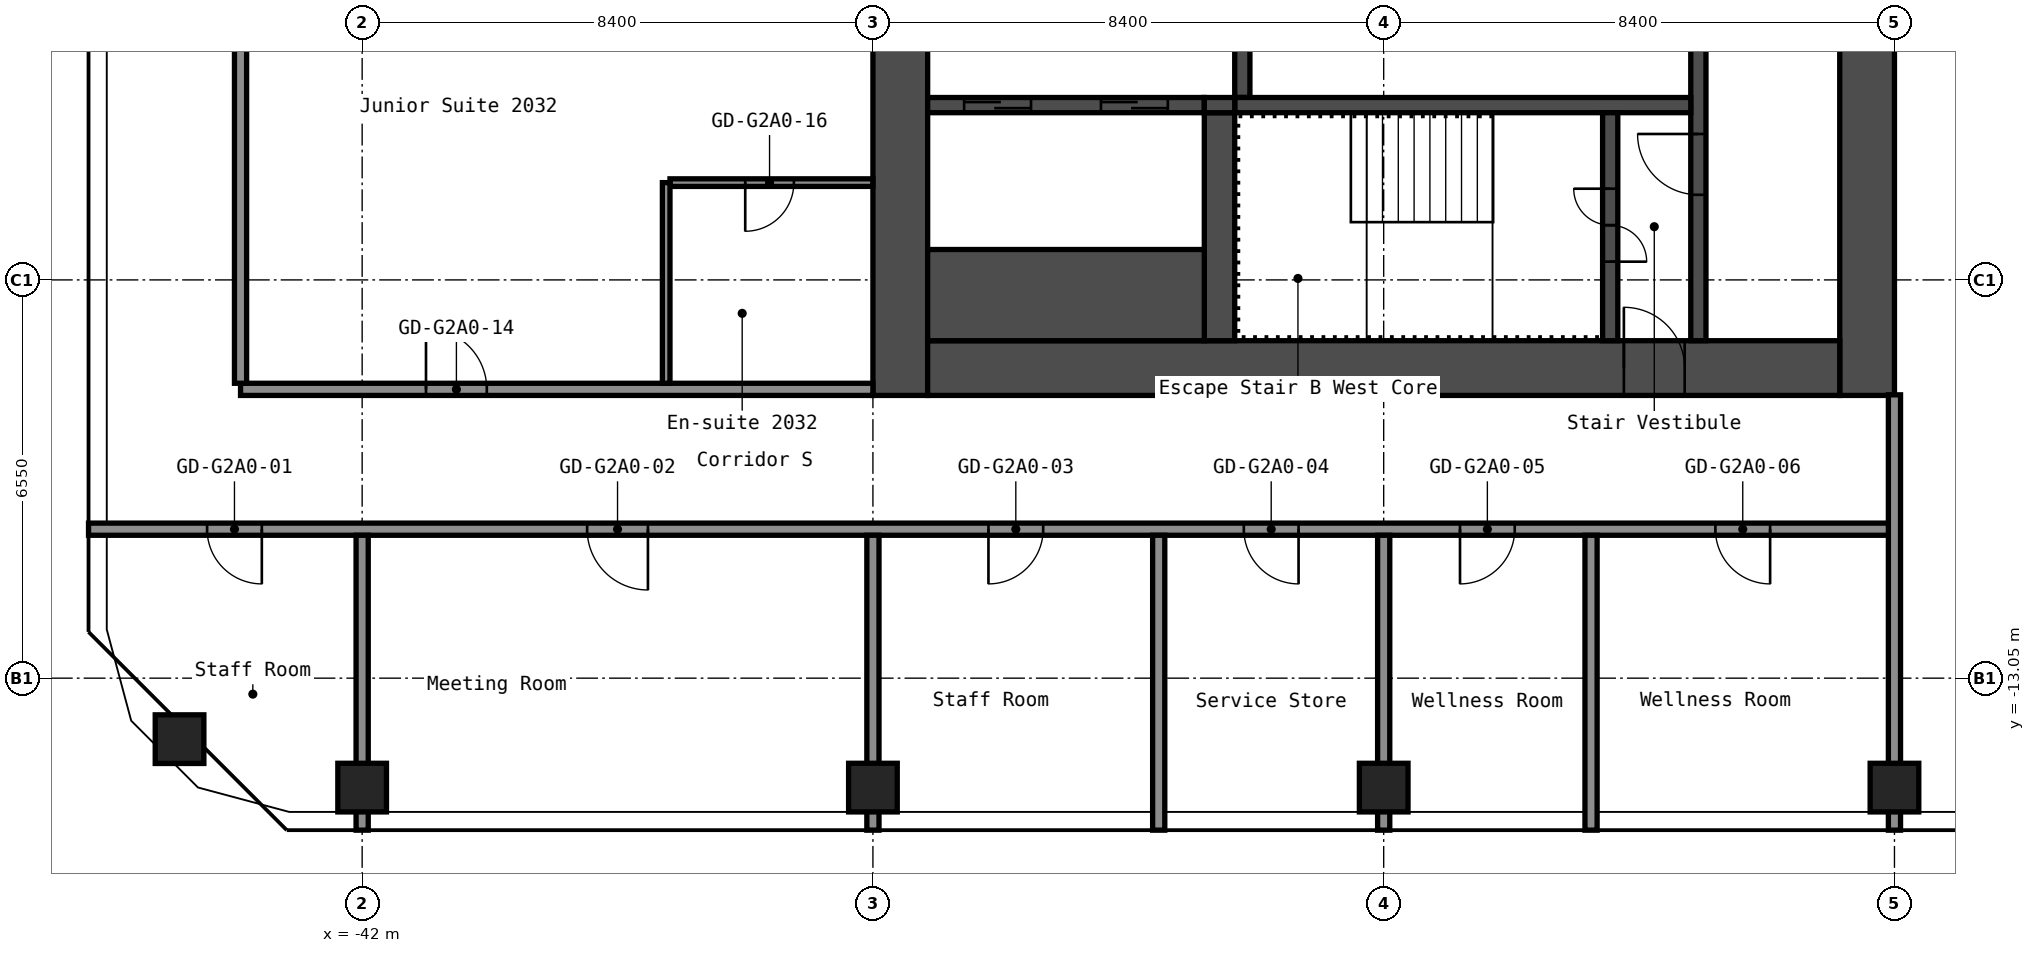
"""IFC4 building model, lengths in metres.
Left out: names, types, materials, properties, quantities, classifications, styles, units other than length and angle.
Written with IfcOpenShell. Run it as: python <this file> out.ifc"""

import sys

from ifc_helpers import new_model, si_unit, direction, frame, frame_2d, origin, origin_2d, place, context, subcontext, project, spatial, rectangle, hollow_rectangle, extrude, element, fill, save


model = new_model("IFC4")
c1 = context("Model", 3, precision=1e-05, world=origin(), true_north=direction((0.0, 1.0)))
c2 = subcontext(c1, "Body", "Model", "MODEL_VIEW")
j1 = project(units=[si_unit("LENGTHUNIT", "METRE"), si_unit("PLANEANGLEUNIT", "RADIAN")], contexts=[c1])
p1 = place(None, origin())
s1 = spatial("IfcSite", under=j1, at=p1, CompositionType="ELEMENT")
p2 = place(p1, origin())
s2 = spatial("IfcBuilding", under=s1, at=p2, CompositionType="ELEMENT")
p3 = place(p2, frame((0.0, 0.0, 75.4)))
s3 = spatial("IfcBuildingStorey", under=s2, at=p3, CompositionType="ELEMENT", Elevation=75.4)
for number, where, z_axis, x_axis in (
    (1, (-45.003, -14.053, 0.0), (0.0, 0.0, 1.0), (1.0, 0.0, 0.0)),
    (2, (-42.0, -14.85, 0.0), (0.0, 0.0, 1.0), (1.0, 0.0, 0.0)),
    (3, (-33.6, -14.85, 0.0), (0.0, 0.0, 1.0), (1.0, 0.0, 0.0)),
    (4, (-25.2, -14.85, 0.0), (0.0, 0.0, 1.0), (1.0, 0.0, 0.0)),
    (5, (-16.8, -14.85, 0.0), (0.0, 0.0, 1.0), (1.0, 0.0, 0.0)),
):
    element("IfcColumn", number, at=place(p3, frame(where, z_axis=z_axis, x_axis=x_axis)), inside=s3, PredefinedType="COLUMN", context=c2, shape_type="SweptSolid", body=[
        extrude(hollow_rectangle(XDim=0.8, YDim=0.8, WallThickness=0.032, at=origin_2d()), origin(), (0.0, 0.0, 1.0), 2.8),
    ])
p4 = place(p3, frame((-17.25, -8.4, 0.0), z_axis=(0.0, 0.0, 1.0), x_axis=(0.0, 1.0, 0.0)))
e6 = element("IfcWall", 6, at=p4, inside=s3, PredefinedType="SHEAR", context=c2, shape_type="SweptSolid", body=[
    extrude(rectangle(XDim=16.8, YDim=0.9, at=frame_2d((8.4, 0.0))), origin(), (0.0, 0.0, 1.0), 2.8),
])
p5 = place(p4, frame((7.6, 0.0, 0.0)))
e7 = element("IfcOpeningElement", 7, at=p5, cuts=e6, PredefinedType="OPENING", context=c2, shape_type="SweptSolid", body=[
    extrude(rectangle(XDim=1.2, YDim=2.1, at=frame_2d((0.6, 1.05))), frame((0.0, 0.46, 0.0), z_axis=(0.0, -1.0, 0.0), x_axis=(1.0, 0.0, 0.0)), (0.0, 0.0, 1.0), 0.92),
])
p6 = place(p3, frame((-33.15, -8.4, 0.0), z_axis=(0.0, 0.0, 1.0), x_axis=(0.0, 1.0, 0.0)))
e8 = element("IfcWall", 8, at=p6, inside=s3, PredefinedType="SHEAR", context=c2, shape_type="SweptSolid", body=[
    extrude(rectangle(XDim=16.8, YDim=0.9, at=frame_2d((8.4, 0.0))), origin(), (0.0, 0.0, 1.0), 2.8),
])
p7 = place(p3, frame((-32.7, -7.95, 0.0), z_axis=(0.0, 0.0, 1.0), x_axis=(1.0, 0.0, 0.0)))
e9 = element("IfcWall", 9, at=p7, inside=s3, PredefinedType="SHEAR", context=c2, shape_type="SweptSolid", body=[
    extrude(rectangle(XDim=15.0, YDim=0.9, at=frame_2d((7.5, 0.0))), origin(), (0.0, 0.0, 1.0), 2.8),
])
p8 = place(p7, frame((11.45, 0.0, 0.0)))
e10 = element("IfcOpeningElement", 10, at=p8, cuts=e9, PredefinedType="OPENING", context=c2, shape_type="SweptSolid", body=[
    extrude(rectangle(XDim=1.0, YDim=2.1, at=frame_2d((0.5, 1.05))), frame((0.0, 0.46, 0.0), z_axis=(0.0, -1.0, 0.0), x_axis=(1.0, 0.0, 0.0)), (0.0, 0.0, 1.0), 0.92),
])
p9 = place(p3, frame((-20.025, -7.5, 0.0), z_axis=(0.0, 0.0, 1.0), x_axis=(0.0, 1.0, 0.0)))
e11 = element("IfcWall", 11, at=p9, inside=s3, PredefinedType="SHEAR", context=c2, shape_type="SweptSolid", body=[
    extrude(rectangle(XDim=6.3, YDim=0.25, at=frame_2d((3.15, 0.0))), origin(), (0.0, 0.0, 1.0), 2.8),
])
p10 = place(p9, frame((2.4, 0.0, 0.0)))
e12 = element("IfcOpeningElement", 12, at=p10, cuts=e11, PredefinedType="OPENING", context=c2, shape_type="SweptSolid", body=[
    extrude(rectangle(XDim=1.0, YDim=2.1, at=frame_2d((0.5, 1.05))), frame((0.0, 0.135, 0.0), z_axis=(0.0, -1.0, 0.0), x_axis=(1.0, 0.0, 0.0)), (0.0, 0.0, 1.0), 0.27),
])
p11 = place(p3, frame((-27.525, -3.5, 0.0), z_axis=(0.0, 0.0, 1.0), x_axis=(0.0, 1.0, 0.0)))
e13 = element("IfcWall", 13, at=p11, inside=s3, PredefinedType="SHEAR", context=c2, shape_type="SweptSolid", body=[
    extrude(rectangle(XDim=2.05, YDim=0.25, at=frame_2d((1.025, 0.0))), origin(), (0.0, 0.0, 1.0), 2.8),
])
p12 = place(p3, frame((-27.65, -3.625, 0.0), z_axis=(0.0, 0.0, 1.0), x_axis=(1.0, 0.0, 0.0)))
e14 = element("IfcWall", 14, at=p12, inside=s3, PredefinedType="SHEAR", context=c2, shape_type="SweptSolid", body=[
    extrude(rectangle(XDim=7.5, YDim=0.25, at=frame_2d((3.75, 0.0))), origin(), (0.0, 0.0, 1.0), 2.8),
])
p13 = place(p3, frame((-21.475, -7.5, 0.0), z_axis=(0.0, 0.0, 1.0), x_axis=(0.0, 1.0, 0.0)))
e15 = element("IfcWall", 15, at=p13, inside=s3, PredefinedType="SHEAR", context=c2, shape_type="SweptSolid", body=[
    extrude(rectangle(XDim=3.75, YDim=0.25, at=frame_2d((1.875, 0.0))), origin(), (0.0, 0.0, 1.0), 2.8),
])
p14 = place(p13, frame((1.3, 0.0, 0.0)))
e16 = element("IfcOpeningElement", 16, at=p14, cuts=e15, PredefinedType="OPENING", context=c2, shape_type="SweptSolid", body=[
    extrude(rectangle(XDim=1.2, YDim=2.1, at=frame_2d((0.6, 1.05))), frame((0.0, 0.135, 0.0), z_axis=(0.0, -1.0, 0.0), x_axis=(1.0, 0.0, 0.0)), (0.0, 0.0, 1.0), 0.27),
])
p15 = place(p3, frame((-27.9, -7.5, 0.0), z_axis=(0.0, 0.0, 1.0), x_axis=(0.0, 1.0, 0.0)))
e17 = element("IfcWall", 17, at=p15, inside=s3, PredefinedType="SHEAR", context=c2, shape_type="SweptSolid", body=[
    extrude(rectangle(XDim=3.75, YDim=0.5, at=frame_2d((1.875, 0.0))), origin(), (0.0, 0.0, 1.0), 2.8),
])
p16 = place(p3, frame((-32.7, -3.625, 0.0), z_axis=(0.0, 0.0, 1.0), x_axis=(1.0, 0.0, 0.0)))
e18 = element("IfcWall", 18, at=p16, inside=s3, PredefinedType="SHEAR", context=c2, shape_type="SweptSolid", body=[
    extrude(rectangle(XDim=4.55, YDim=0.25, at=frame_2d((2.275, 0.0))), origin(), (0.0, 0.0, 1.0), 2.8),
])
p17 = place(p16, frame((2.85, 0.0, 0.0)))
e19 = element("IfcOpeningElement", 19, at=p17, cuts=e18, PredefinedType="OPENING", context=c2, shape_type="SweptSolid", body=[
    extrude(rectangle(XDim=1.1, YDim=2.1, at=frame_2d((0.55, 1.05))), frame((0.0, 0.135, 0.0), z_axis=(0.0, -1.0, 0.0), x_axis=(1.0, 0.0, 0.0)), (0.0, 0.0, 1.0), 0.27),
])
p18 = place(p16, frame((0.6, 0.0, 0.0)))
e20 = element("IfcOpeningElement", 20, at=p18, cuts=e18, PredefinedType="OPENING", context=c2, shape_type="SweptSolid", body=[
    extrude(rectangle(XDim=1.1, YDim=2.1, at=frame_2d((0.55, 1.05))), frame((0.0, 0.135, 0.0), z_axis=(0.0, -1.0, 0.0), x_axis=(1.0, 0.0, 0.0)), (0.0, 0.0, 1.0), 0.27),
])
p19 = place(p3, frame((-32.7, -6.75, 0.0), z_axis=(0.0, 0.0, 1.0), x_axis=(1.0, 0.0, 0.0)))
e21 = element("IfcWall", 21, at=p19, inside=s3, PredefinedType="SHEAR", context=c2, shape_type="SweptSolid", body=[
    extrude(rectangle(XDim=4.55, YDim=1.5, at=frame_2d((2.275, 0.0))), origin(), (0.0, 0.0, 1.0), 2.8),
])
p20 = place(p3, frame((-28.15, -3.625, 0.0), z_axis=(0.0, 0.0, 1.0), x_axis=(1.0, 0.0, 0.0)))
e22 = element("IfcWall", 22, at=p20, inside=s3, PredefinedType="SHEAR", context=c2, shape_type="SweptSolid", body=[
    extrude(rectangle(XDim=0.5, YDim=0.25, at=frame_2d((0.25, 0.0))), origin(), (0.0, 0.0, 1.0), 2.8),
])
p21 = place(p3, frame((-46.5, -10.6, 0.0), z_axis=(0.0, 0.0, 1.0), x_axis=(1.0, 0.0, 0.0)))
e23 = element("IfcWall", 23, at=p21, inside=s3, PredefinedType="PARTITIONING", context=c2, shape_type="SweptSolid", body=[
    extrude(rectangle(XDim=29.7, YDim=0.2, at=frame_2d((14.85, 0.0))), origin(), (0.0, 0.0, 1.0), 2.8),
])
p22 = place(p21, frame((1.95, 0.0, 0.0)))
e24 = element("IfcOpeningElement", 24, at=p22, cuts=e23, PredefinedType="OPENING", context=c2, shape_type="SweptSolid", body=[
    extrude(rectangle(XDim=0.9, YDim=2.1, at=frame_2d((0.45, 1.05))), frame((0.0, 0.11, 0.0), z_axis=(0.0, -1.0, 0.0), x_axis=(1.0, 0.0, 0.0)), (0.0, 0.0, 1.0), 0.22),
])
p23 = place(p21, frame((8.2, 0.0, 0.0)))
e25 = element("IfcOpeningElement", 25, at=p23, cuts=e23, PredefinedType="OPENING", context=c2, shape_type="SweptSolid", body=[
    extrude(rectangle(XDim=1.0, YDim=2.1, at=frame_2d((0.5, 1.05))), frame((0.0, 0.11, 0.0), z_axis=(0.0, -1.0, 0.0), x_axis=(1.0, 0.0, 0.0)), (0.0, 0.0, 1.0), 0.22),
])
p24 = place(p21, frame((14.8, 0.0, 0.0)))
e26 = element("IfcOpeningElement", 26, at=p24, cuts=e23, PredefinedType="OPENING", context=c2, shape_type="SweptSolid", body=[
    extrude(rectangle(XDim=0.9, YDim=2.1, at=frame_2d((0.45, 1.05))), frame((0.0, 0.11, 0.0), z_axis=(0.0, -1.0, 0.0), x_axis=(1.0, 0.0, 0.0)), (0.0, 0.0, 1.0), 0.22),
])
p25 = place(p21, frame((19.0, 0.0, 0.0)))
e27 = element("IfcOpeningElement", 27, at=p25, cuts=e23, PredefinedType="OPENING", context=c2, shape_type="SweptSolid", body=[
    extrude(rectangle(XDim=0.9, YDim=2.1, at=frame_2d((0.45, 1.05))), frame((0.0, 0.11, 0.0), z_axis=(0.0, -1.0, 0.0), x_axis=(1.0, 0.0, 0.0)), (0.0, 0.0, 1.0), 0.22),
])
p26 = place(p21, frame((22.555, 0.0, 0.0)))
e28 = element("IfcOpeningElement", 28, at=p26, cuts=e23, PredefinedType="OPENING", context=c2, shape_type="SweptSolid", body=[
    extrude(rectangle(XDim=0.9, YDim=2.1, at=frame_2d((0.45, 1.05))), frame((0.0, 0.11, 0.0), z_axis=(0.0, -1.0, 0.0), x_axis=(1.0, 0.0, 0.0)), (0.0, 0.0, 1.0), 0.22),
])
p27 = place(p21, frame((26.755, 0.0, 0.0)))
e29 = element("IfcOpeningElement", 29, at=p27, cuts=e23, PredefinedType="OPENING", context=c2, shape_type="SweptSolid", body=[
    extrude(rectangle(XDim=0.9, YDim=2.1, at=frame_2d((0.45, 1.05))), frame((0.0, 0.11, 0.0), z_axis=(0.0, -1.0, 0.0), x_axis=(1.0, 0.0, 0.0)), (0.0, 0.0, 1.0), 0.22),
])
p28 = place(p3, frame((-44.0, -8.3, 0.0), z_axis=(0.0, 0.0, 1.0), x_axis=(1.0, 0.0, 0.0)))
e30 = element("IfcWall", 30, at=p28, inside=s3, PredefinedType="PARTITIONING", context=c2, shape_type="SweptSolid", body=[
    extrude(rectangle(XDim=10.4, YDim=0.2, at=frame_2d((5.2, 0.0))), origin(), (0.0, 0.0, 1.0), 2.8),
])
p29 = place(p28, frame((3.05, 0.0, 0.0)))
e31 = element("IfcOpeningElement", 31, at=p29, cuts=e30, PredefinedType="OPENING", context=c2, shape_type="SweptSolid", body=[
    extrude(rectangle(XDim=1.0, YDim=2.1, at=frame_2d((0.5, 1.05))), frame((0.0, 0.11, 0.0), z_axis=(0.0, -1.0, 0.0), x_axis=(1.0, 0.0, 0.0)), (0.0, 0.0, 1.0), 0.22),
])
p30 = place(p3, frame((-36.938, -4.9, 0.0), z_axis=(0.0, 0.0, 1.0), x_axis=(1.0, 0.0, 0.0)))
e32 = element("IfcWall", 32, at=p30, inside=s3, PredefinedType="PARTITIONING", context=c2, shape_type="SweptSolid", body=[
    extrude(rectangle(XDim=3.337, YDim=0.125, at=frame_2d((1.669, 0.0))), origin(), (0.0, 0.0, 1.0), 2.8),
])
p31 = place(p30, frame((1.238, 0.0, 0.0)))
e33 = element("IfcOpeningElement", 33, at=p31, cuts=e32, PredefinedType="OPENING", context=c2, shape_type="SweptSolid", body=[
    extrude(rectangle(XDim=0.8, YDim=2.1, at=frame_2d((0.4, 1.05))), frame((0.0, 0.073, 0.0), z_axis=(0.0, -1.0, 0.0), x_axis=(1.0, 0.0, 0.0)), (0.0, 0.0, 1.0), 0.145),
])
p32 = place(p3, frame((-44.0, -8.2, 0.0), z_axis=(0.0, 0.0, 1.0), x_axis=(0.0, 1.0, 0.0)))
e34 = element("IfcWall", 34, at=p32, inside=s3, PredefinedType="PARTITIONING", context=c2, shape_type="SweptSolid", body=[
    extrude(rectangle(XDim=16.4, YDim=0.2, at=frame_2d((8.2, 0.0))), origin(), (0.0, 0.0, 1.0), 2.8),
])
p33 = place(p3, frame((-42.0, -15.55, 0.0), z_axis=(0.0, 0.0, 1.0), x_axis=(0.0, 1.0, 0.0)))
e35 = element("IfcWall", 35, at=p33, inside=s3, PredefinedType="PARTITIONING", context=c2, shape_type="SweptSolid", body=[
    extrude(rectangle(XDim=4.85, YDim=0.2, at=frame_2d((2.425, 0.0))), origin(), (0.0, 0.0, 1.0), 2.8),
])
p34 = place(p3, frame((-37.0, -8.2, 0.0), z_axis=(0.0, 0.0, 1.0), x_axis=(0.0, 1.0, 0.0)))
e36 = element("IfcWall", 36, at=p34, inside=s3, PredefinedType="PARTITIONING", context=c2, shape_type="SweptSolid", body=[
    extrude(rectangle(XDim=3.3, YDim=0.125, at=frame_2d((1.65, 0.0))), origin(), (0.0, 0.0, 1.0), 2.8),
])
for number, where, z_axis, x_axis in (
    (37, (-33.6, -15.55, 0.0), (0.0, 0.0, 1.0), (0.0, 1.0, 0.0)),
    (38, (-28.9, -15.55, 0.0), (0.0, 0.0, 1.0), (0.0, 1.0, 0.0)),
    (39, (-25.2, -15.55, 0.0), (0.0, 0.0, 1.0), (0.0, 1.0, 0.0)),
    (40, (-21.79, -15.55, 0.0), (0.0, 0.0, 1.0), (0.0, 1.0, 0.0)),
):
    element("IfcWall", number, at=place(p3, frame(where, z_axis=z_axis, x_axis=x_axis)), inside=s3, PredefinedType="PARTITIONING", context=c2, shape_type="SweptSolid", body=[
        extrude(rectangle(XDim=4.85, YDim=0.2, at=frame_2d((2.425, 0.0))), origin(), (0.0, 0.0, 1.0), 2.8),
    ])
p35 = place(p3, frame((-16.8, -15.55, 0.0), z_axis=(0.0, 0.0, 1.0), x_axis=(0.0, 1.0, 0.0)))
e41 = element("IfcWall", 41, at=p35, inside=s3, PredefinedType="PARTITIONING", context=c2, shape_type="SweptSolid", body=[
    extrude(rectangle(XDim=7.16, YDim=0.2, at=frame_2d((3.58, 0.0))), origin(), (0.0, 0.0, 1.0), 2.8),
])
p36 = place(p8, origin())
e42 = element("IfcDoor", 42, at=p36, inside=s3, OperationType="SINGLE_SWING_RIGHT", PredefinedType="DOOR", context=c2, shape_type="SweptSolid", body=[
    extrude(rectangle(XDim=1.0, YDim=2.1, at=frame_2d((0.5, 1.05))), frame((0.0, 0.025, 0.0), z_axis=(0.0, -1.0, 0.0), x_axis=(1.0, 0.0, 0.0)), (0.0, 0.0, 1.0), 0.05),
])
fill(e10, e42)
p37 = place(p14, origin())
e43 = element("IfcDoor", 43, at=p37, inside=s3, OperationType="DOUBLE_DOOR_SINGLE_SWING", PredefinedType="DOOR", context=c2, shape_type="SweptSolid", body=[
    extrude(rectangle(XDim=1.2, YDim=2.1, at=frame_2d((0.6, 1.05))), frame((0.0, 0.025, 0.0), z_axis=(0.0, -1.0, 0.0), x_axis=(1.0, 0.0, 0.0)), (0.0, 0.0, 1.0), 0.05),
])
fill(e16, e43)
p38 = place(p10, origin())
e44 = element("IfcDoor", 44, at=p38, inside=s3, OperationType="SINGLE_SWING_LEFT", PredefinedType="DOOR", context=c2, shape_type="SweptSolid", body=[
    extrude(rectangle(XDim=1.0, YDim=2.1, at=frame_2d((0.5, 1.05))), frame((0.0, 0.025, 0.0), z_axis=(0.0, -1.0, 0.0), x_axis=(1.0, 0.0, 0.0)), (0.0, 0.0, 1.0), 0.05),
])
fill(e12, e44)
p39 = place(p17, origin())
e45 = element("IfcDoor", 45, at=p39, inside=s3, OperationType="DOUBLE_DOOR_SLIDING", PredefinedType="DOOR", context=c2, shape_type="SweptSolid", body=[
    extrude(rectangle(XDim=1.1, YDim=2.1, at=frame_2d((0.55, 1.05))), frame((0.0, 0.025, 0.0), z_axis=(0.0, -1.0, 0.0), x_axis=(1.0, 0.0, 0.0)), (0.0, 0.0, 1.0), 0.05),
])
fill(e19, e45)
p40 = place(p18, origin())
e46 = element("IfcDoor", 46, at=p40, inside=s3, OperationType="DOUBLE_DOOR_SLIDING", PredefinedType="DOOR", context=c2, shape_type="SweptSolid", body=[
    extrude(rectangle(XDim=1.1, YDim=2.1, at=frame_2d((0.55, 1.05))), frame((0.0, 0.025, 0.0), z_axis=(0.0, -1.0, 0.0), x_axis=(1.0, 0.0, 0.0)), (0.0, 0.0, 1.0), 0.05),
])
fill(e20, e46)
p41 = place(p22, origin())
e47 = element("IfcDoor", 47, at=p41, inside=s3, OperationType="SINGLE_SWING_RIGHT", PredefinedType="DOOR", context=c2, shape_type="SweptSolid", body=[
    extrude(rectangle(XDim=0.9, YDim=2.1, at=frame_2d((0.45, 1.05))), frame((0.0, 0.025, 0.0), z_axis=(0.0, -1.0, 0.0), x_axis=(1.0, 0.0, 0.0)), (0.0, 0.0, 1.0), 0.05),
])
fill(e24, e47)
p42 = place(p23, origin())
e48 = element("IfcDoor", 48, at=p42, inside=s3, OperationType="SINGLE_SWING_RIGHT", PredefinedType="DOOR", context=c2, shape_type="SweptSolid", body=[
    extrude(rectangle(XDim=1.0, YDim=2.1, at=frame_2d((0.5, 1.05))), frame((0.0, 0.025, 0.0), z_axis=(0.0, -1.0, 0.0), x_axis=(1.0, 0.0, 0.0)), (0.0, 0.0, 1.0), 0.05),
])
fill(e25, e48)
p43 = place(p24, origin())
e49 = element("IfcDoor", 49, at=p43, inside=s3, OperationType="SINGLE_SWING_LEFT", PredefinedType="DOOR", context=c2, shape_type="SweptSolid", body=[
    extrude(rectangle(XDim=0.9, YDim=2.1, at=frame_2d((0.45, 1.05))), frame((0.0, 0.025, 0.0), z_axis=(0.0, -1.0, 0.0), x_axis=(1.0, 0.0, 0.0)), (0.0, 0.0, 1.0), 0.05),
])
fill(e26, e49)
p44 = place(p25, origin())
e50 = element("IfcDoor", 50, at=p44, inside=s3, OperationType="SINGLE_SWING_RIGHT", PredefinedType="DOOR", context=c2, shape_type="SweptSolid", body=[
    extrude(rectangle(XDim=0.9, YDim=2.1, at=frame_2d((0.45, 1.05))), frame((0.0, 0.025, 0.0), z_axis=(0.0, -1.0, 0.0), x_axis=(1.0, 0.0, 0.0)), (0.0, 0.0, 1.0), 0.05),
])
fill(e27, e50)
p45 = place(p26, origin())
e51 = element("IfcDoor", 51, at=p45, inside=s3, OperationType="SINGLE_SWING_LEFT", PredefinedType="DOOR", context=c2, shape_type="SweptSolid", body=[
    extrude(rectangle(XDim=0.9, YDim=2.1, at=frame_2d((0.45, 1.05))), frame((0.0, 0.025, 0.0), z_axis=(0.0, -1.0, 0.0), x_axis=(1.0, 0.0, 0.0)), (0.0, 0.0, 1.0), 0.05),
])
fill(e28, e51)
p46 = place(p27, origin())
e52 = element("IfcDoor", 52, at=p46, inside=s3, OperationType="SINGLE_SWING_RIGHT", PredefinedType="DOOR", context=c2, shape_type="SweptSolid", body=[
    extrude(rectangle(XDim=0.9, YDim=2.1, at=frame_2d((0.45, 1.05))), frame((0.0, 0.025, 0.0), z_axis=(0.0, -1.0, 0.0), x_axis=(1.0, 0.0, 0.0)), (0.0, 0.0, 1.0), 0.05),
])
fill(e29, e52)
p47 = place(p29, origin())
e53 = element("IfcDoor", 53, at=p47, inside=s3, OperationType="SINGLE_SWING_RIGHT", PredefinedType="DOOR", context=c2, shape_type="SweptSolid", body=[
    extrude(rectangle(XDim=1.0, YDim=2.1, at=frame_2d((0.5, 1.05))), frame((0.0, 0.025, 0.0), z_axis=(0.0, -1.0, 0.0), x_axis=(1.0, 0.0, 0.0)), (0.0, 0.0, 1.0), 0.05),
])
fill(e31, e53)
p48 = place(p31, origin())
e54 = element("IfcDoor", 54, at=p48, inside=s3, OperationType="SINGLE_SWING_LEFT", PredefinedType="DOOR", context=c2, shape_type="SweptSolid", body=[
    extrude(rectangle(XDim=0.8, YDim=2.1, at=frame_2d((0.4, 1.05))), frame((0.0, 0.025, 0.0), z_axis=(0.0, -1.0, 0.0), x_axis=(1.0, 0.0, 0.0)), (0.0, 0.0, 1.0), 0.05),
])
fill(e33, e54)
save(model, sys.argv[1])
